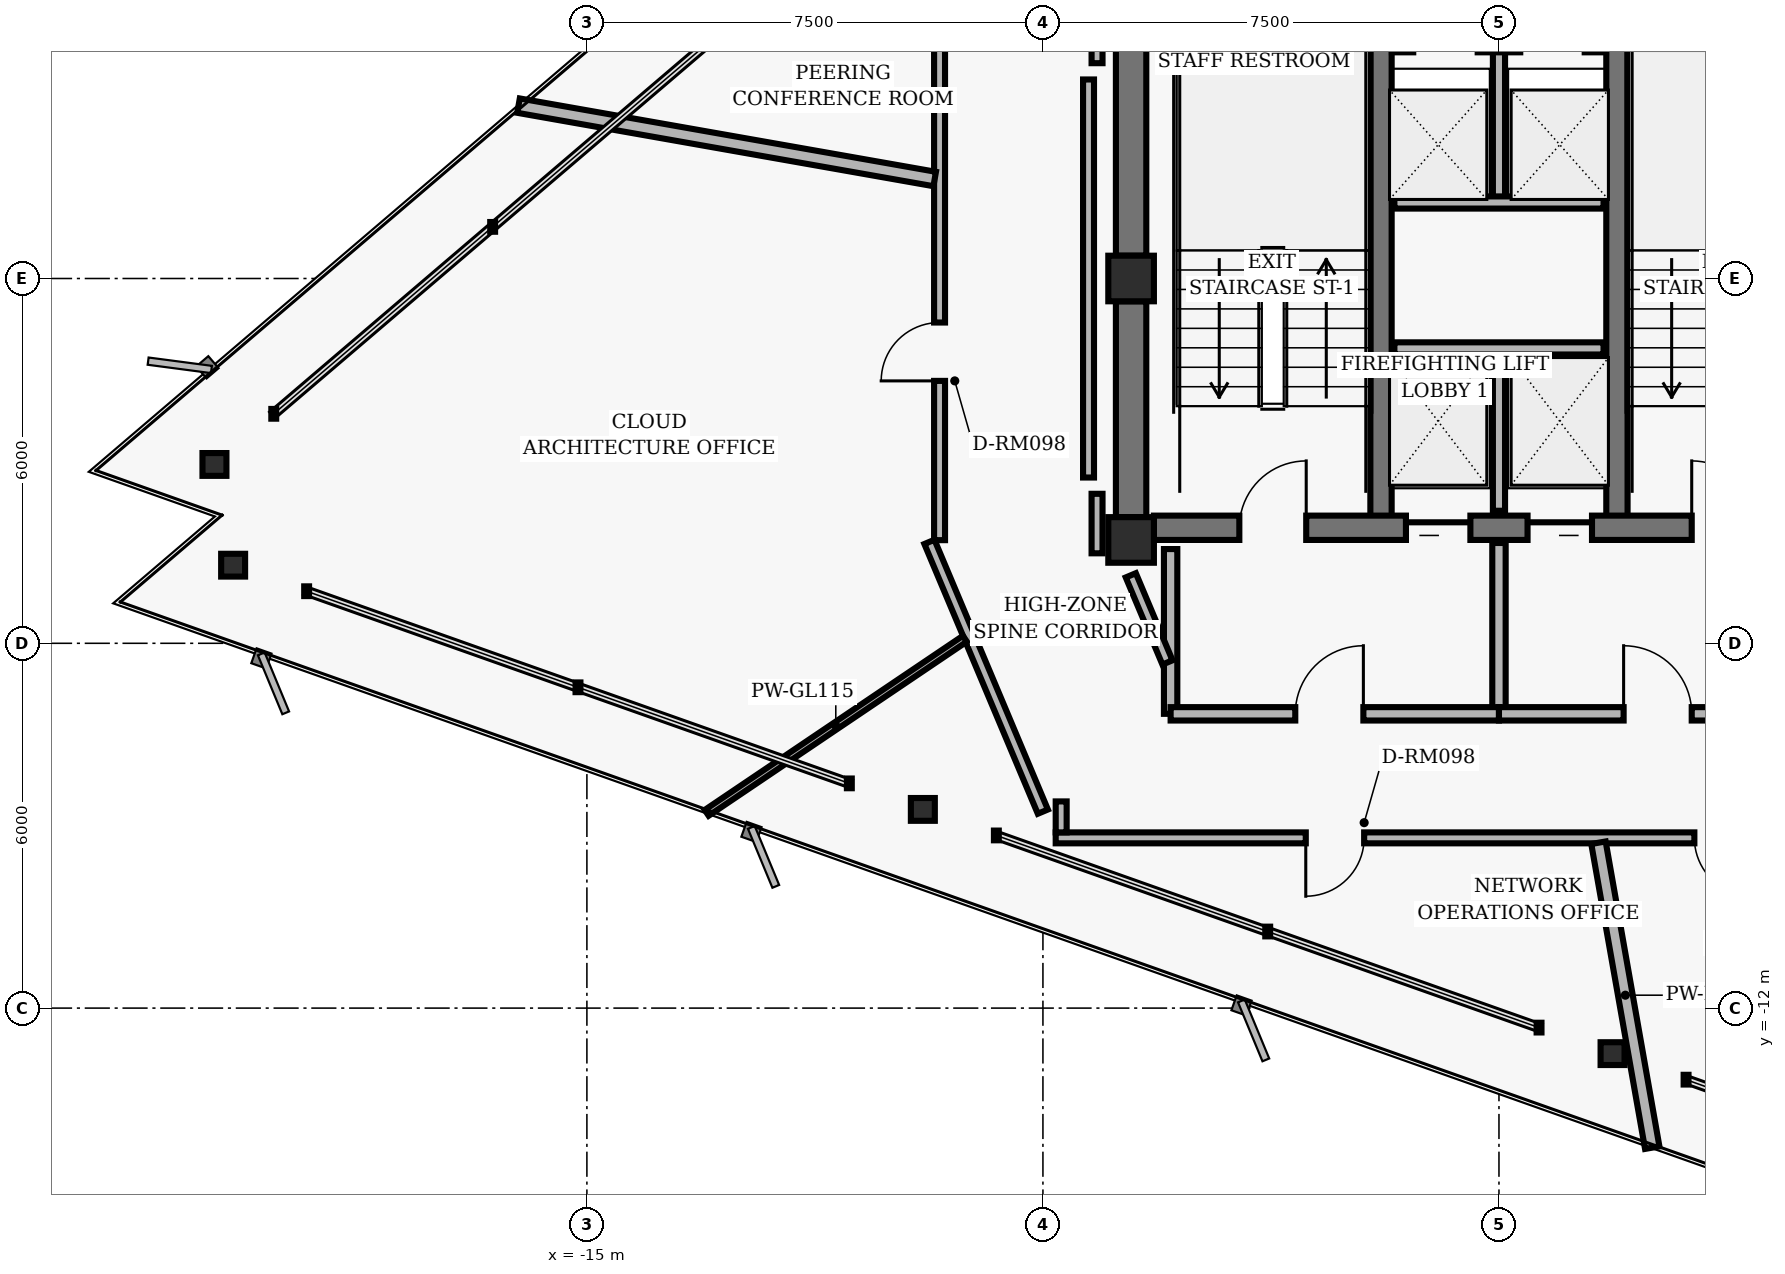
"""IFC4 building model, lengths in metres.
Left out: names, types, materials, properties, quantities, classifications, styles, units other than length and angle.
Written with IfcOpenShell. Run it as: python <this file> out.ifc"""

import sys

from ifc_helpers import new_model, si_unit, direction, frame, frame_2d, origin, origin_2d, place, context, subcontext, project, spatial, rectangle, hollow_rectangle, i_section, extrude, element, fill, save


model = new_model("IFC4")
c1 = context("Model", 3, precision=1e-05, world=origin(), true_north=direction((0.0, 1.0)))
c2 = subcontext(c1, "Body", "Model", "MODEL_VIEW")
j1 = project(units=[si_unit("LENGTHUNIT", "METRE"), si_unit("PLANEANGLEUNIT", "RADIAN")], contexts=[c1])
p1 = place(None, origin())
s1 = spatial("IfcSite", under=j1, at=p1, CompositionType="ELEMENT")
p2 = place(p1, origin())
s2 = spatial("IfcBuilding", under=s1, at=p2, CompositionType="ELEMENT")
p3 = place(p2, frame((0.0, 0.0, 190.56)))
s3 = spatial("IfcBuildingStorey", under=s2, at=p3, CompositionType="ELEMENT", Elevation=190.56)
for number, where, z_axis, x_axis in (
    (1, (-6.05, 0.0, 0.0), (0.0, 0.0, 1.0), (1.0, 0.0, 0.0)),
    (2, (-6.05, -4.3, 0.0), (0.0, 0.0, 1.0), (1.0, 0.0, 0.0)),
):
    element("IfcColumn", number, at=place(p3, frame(where, z_axis=z_axis, x_axis=x_axis)), inside=s3, PredefinedType="COLUMN", context=c2, shape_type="SweptSolid", body=[
        extrude(hollow_rectangle(XDim=0.75, YDim=0.75, WallThickness=0.05, InnerFilletRadius=0.02, OuterFilletRadius=0.04, at=origin_2d()), origin(), (0.0, 0.0, 1.0), 3.04),
    ])
p4 = place(p3, frame((-6.05, 0.375, 0.0), z_axis=(0.0, 0.0, 1.0), x_axis=(0.0, 1.0, 0.0)))
e3 = element("IfcWall", 3, at=p4, inside=s3, PredefinedType="SHEAR", context=c2, shape_type="SweptSolid", body=[
    extrude(rectangle(XDim=3.75, YDim=0.5, at=frame_2d((1.875, 0.0))), origin(), (0.0, 0.0, 1.0), 2.618),
])
p5 = place(p3, frame((-6.05, -3.925, 0.0), z_axis=(0.0, 0.0, 1.0), x_axis=(0.0, 1.0, 0.0)))
e4 = element("IfcWall", 4, at=p5, inside=s3, PredefinedType="SHEAR", context=c2, shape_type="SweptSolid", body=[
    extrude(rectangle(XDim=3.55, YDim=0.5, at=frame_2d((1.775, 0.0))), origin(), (0.0, 0.0, 1.0), 2.618),
])
for number, where, z_axis, x_axis in (
    (5, (-1.94, -4.1, 0.0), (0.0, 0.0, 1.0), (0.0, 1.0, 0.0)),
    (6, (1.94, -4.1, 0.0), (0.0, 0.0, 1.0), (0.0, 1.0, 0.0)),
):
    element("IfcWall", number, at=place(p3, frame(where, z_axis=z_axis, x_axis=x_axis)), inside=s3, PredefinedType="SHEAR", context=c2, shape_type="SweptSolid", body=[
        extrude(rectangle(XDim=8.2, YDim=0.35, at=frame_2d((4.1, 0.0))), origin(), (0.0, 0.0, 1.0), 2.618),
    ])
p6 = place(p3, frame((-5.675, -4.1, 0.0), z_axis=(0.0, 0.0, 1.0), x_axis=(1.0, 0.0, 0.0)))
e7 = element("IfcWall", 7, at=p6, inside=s3, PredefinedType="SHEAR", context=c2, shape_type="SweptSolid", body=[
    extrude(rectangle(XDim=11.35, YDim=0.4, at=frame_2d((5.675, 0.0))), origin(), (0.0, 0.0, 1.0), 2.618),
])
p7 = place(p6, frame((1.405, 0.0, 0.0)))
e8 = element("IfcOpeningElement", 8, at=p7, cuts=e7, PredefinedType="OPENING", context=c2, shape_type="SweptSolid", body=[
    extrude(rectangle(XDim=1.1, YDim=2.04, at=frame_2d((0.55, 1.02))), frame((0.0, 0.21, 0.0), z_axis=(0.0, -1.0, 0.0), x_axis=(1.0, 0.0, 0.0)), (0.0, 0.0, 1.0), 0.42),
])
p8 = place(p6, frame((8.845, 0.0, 0.0)))
e9 = element("IfcOpeningElement", 9, at=p8, cuts=e7, PredefinedType="OPENING", context=c2, shape_type="SweptSolid", body=[
    extrude(rectangle(XDim=1.1, YDim=2.04, at=frame_2d((0.55, 1.02))), frame((0.0, 0.21, 0.0), z_axis=(0.0, -1.0, 0.0), x_axis=(1.0, 0.0, 0.0)), (0.0, 0.0, 1.0), 0.42),
])
p9 = place(p6, frame((4.145, 0.0, 0.0)))
e10 = element("IfcOpeningElement", 10, at=p9, cuts=e7, PredefinedType="OPENING", context=c2, shape_type="SweptSolid", body=[
    extrude(rectangle(XDim=1.06, YDim=2.04, at=frame_2d((0.53, 1.02))), frame((0.0, 0.21, 0.0), z_axis=(0.0, -1.0, 0.0), x_axis=(1.0, 0.0, 0.0)), (0.0, 0.0, 1.0), 0.42),
])
p10 = place(p6, frame((6.145, 0.0, 0.0)))
e11 = element("IfcOpeningElement", 11, at=p10, cuts=e7, PredefinedType="OPENING", context=c2, shape_type="SweptSolid", body=[
    extrude(rectangle(XDim=1.06, YDim=2.04, at=frame_2d((0.53, 1.02))), frame((0.0, 0.21, 0.0), z_axis=(0.0, -1.0, 0.0), x_axis=(1.0, 0.0, 0.0)), (0.0, 0.0, 1.0), 0.42),
])
for number, where, z_axis, x_axis in (
    (12, (-21.125, -3.059, 0.0), (0.0, 0.0, 1.0), (1.0, 0.0, 0.0)),
    (13, (-20.818, -4.715, 0.0), (0.0, 0.0, 1.0), (1.0, 0.0, 0.0)),
    (14, (-9.475, -8.732, 0.0), (0.0, 0.0, 1.0), (1.0, 0.0, 0.0)),
    (15, (1.868, -12.749, 0.0), (0.0, 0.0, 1.0), (1.0, 0.0, 0.0)),
):
    element("IfcColumn", number, at=place(p3, frame(where, z_axis=z_axis, x_axis=x_axis)), inside=s3, PredefinedType="COLUMN", context=c2, shape_type="SweptSolid", body=[
        extrude(i_section(OverallWidth=0.394, OverallDepth=0.375, WebThickness=0.017, FlangeThickness=0.028, FilletRadius=0.016, at=origin_2d()), origin(), (0.0, 0.0, 1.0), 3.04),
    ])
p11 = place(p3, frame((0.0, -3.82, 0.0), z_axis=(0.0, 0.0, 1.0), x_axis=(0.0, 1.0, 0.0)))
e16 = element("IfcWall", 16, at=p11, inside=s3, PredefinedType="PARTITIONING", context=c2, shape_type="SweptSolid", body=[
    extrude(rectangle(XDim=2.67, YDim=0.2, at=frame_2d((1.335, 0.0))), origin(), (0.0, 0.0, 1.0), 2.593),
])
p12 = place(p3, frame((-1.72, -1.15, 0.0), z_axis=(0.0, 0.0, 1.0), x_axis=(1.0, 0.0, 0.0)))
e17 = element("IfcWall", 17, at=p12, inside=s3, PredefinedType="PARTITIONING", context=c2, shape_type="SweptSolid", body=[
    extrude(rectangle(XDim=3.44, YDim=0.2, at=frame_2d((1.72, 0.0))), origin(), (0.0, 0.0, 1.0), 2.593),
])
p13 = place(p3, frame((-5.4, -7.16, 0.0), z_axis=(0.0, 0.0, 1.0), x_axis=(0.0, 1.0, 0.0)))
e18 = element("IfcWall", 18, at=p13, inside=s3, PredefinedType="PARTITIONING", context=c2, shape_type="SweptSolid", body=[
    extrude(rectangle(XDim=2.71, YDim=0.22, at=frame_2d((1.355, 0.0))), origin(), (0.0, 0.0, 1.0), 2.593),
])
p14 = place(p3, frame((0.0, -7.16, 0.0), z_axis=(0.0, 0.0, 1.0), x_axis=(0.0, 1.0, 0.0)))
e19 = element("IfcWall", 19, at=p14, inside=s3, PredefinedType="PARTITIONING", context=c2, shape_type="SweptSolid", body=[
    extrude(rectangle(XDim=2.81, YDim=0.22, at=frame_2d((1.405, 0.0))), origin(), (0.0, 0.0, 1.0), 2.593),
])
p15 = place(p3, frame((-5.4, -7.16, 0.0), z_axis=(0.0, 0.0, 1.0), x_axis=(1.0, 0.0, 0.0)))
e20 = element("IfcWall", 20, at=p15, inside=s3, PredefinedType="PARTITIONING", context=c2, shape_type="SweptSolid", body=[
    extrude(rectangle(XDim=5.4, YDim=0.22, at=frame_2d((2.7, 0.0))), origin(), (0.0, 0.0, 1.0), 2.215),
])
p16 = place(p15, frame((2.05, 0.0, 0.0)))
e21 = element("IfcOpeningElement", 21, at=p16, cuts=e20, PredefinedType="OPENING", context=c2, shape_type="SweptSolid", body=[
    extrude(rectangle(XDim=1.12, YDim=2.02, at=frame_2d((0.56, 1.01))), frame((0.0, 0.12, 0.0), z_axis=(0.0, -1.0, 0.0), x_axis=(1.0, 0.0, 0.0)), (0.0, 0.0, 1.0), 0.24),
])
p17 = place(p3, frame((0.0, -7.16, 0.0), z_axis=(0.0, 0.0, 1.0), x_axis=(1.0, 0.0, 0.0)))
e22 = element("IfcWall", 22, at=p17, inside=s3, PredefinedType="PARTITIONING", context=c2, shape_type="SweptSolid", body=[
    extrude(rectangle(XDim=5.4, YDim=0.22, at=frame_2d((2.7, 0.0))), origin(), (0.0, 0.0, 1.0), 2.215),
])
p18 = place(p17, frame((2.05, 0.0, 0.0)))
e23 = element("IfcOpeningElement", 23, at=p18, cuts=e22, PredefinedType="OPENING", context=c2, shape_type="SweptSolid", body=[
    extrude(rectangle(XDim=1.12, YDim=2.02, at=frame_2d((0.56, 1.01))), frame((0.0, 0.12, 0.0), z_axis=(0.0, -1.0, 0.0), x_axis=(1.0, 0.0, 0.0)), (0.0, 0.0, 1.0), 0.24),
])
p19 = place(p3, frame((0.0, 1.25, 0.0), z_axis=(0.0, 0.0, 1.0), x_axis=(0.0, 1.0, 0.0)))
e24 = element("IfcWall", 24, at=p19, inside=s3, PredefinedType="PARTITIONING", context=c2, shape_type="SweptSolid", body=[
    extrude(rectangle(XDim=2.77, YDim=0.2, at=frame_2d((1.385, 0.0))), origin(), (0.0, 0.0, 1.0), 2.593),
])
p20 = place(p3, frame((-1.72, 1.25, 0.0), z_axis=(0.0, 0.0, 1.0), x_axis=(1.0, 0.0, 0.0)))
e25 = element("IfcWall", 25, at=p20, inside=s3, PredefinedType="PARTITIONING", context=c2, shape_type="SweptSolid", body=[
    extrude(rectangle(XDim=3.44, YDim=0.2, at=frame_2d((1.72, 0.0))), origin(), (0.0, 0.0, 1.0), 2.593),
])
p21 = place(p3, frame((-1.76, 3.82, 0.0), z_axis=(0.0, 0.0, 1.0), x_axis=(1.0, 0.0, 0.0)))
e26 = element("IfcWall", 26, at=p21, inside=s3, PredefinedType="PARTITIONING", context=c2, shape_type="SweptSolid", body=[
    extrude(rectangle(XDim=3.52, YDim=0.2, at=frame_2d((1.76, 0.0))), origin(), (0.0, 0.0, 1.0), 2.593),
])
p22 = place(p21, frame((0.35, 0.0, 0.0)))
e27 = element("IfcOpeningElement", 27, at=p22, cuts=e26, PredefinedType="OPENING", context=c2, shape_type="SweptSolid", body=[
    extrude(rectangle(XDim=1.06, YDim=2.04, at=frame_2d((0.53, 1.02))), frame((0.0, 0.11, 0.0), z_axis=(0.0, -1.0, 0.0), x_axis=(1.0, 0.0, 0.0)), (0.0, 0.0, 1.0), 0.22),
])
p23 = place(p21, frame((2.11, 0.0, 0.0)))
e28 = element("IfcOpeningElement", 28, at=p23, cuts=e26, PredefinedType="OPENING", context=c2, shape_type="SweptSolid", body=[
    extrude(rectangle(XDim=1.06, YDim=2.04, at=frame_2d((0.53, 1.02))), frame((0.0, 0.11, 0.0), z_axis=(0.0, -1.0, 0.0), x_axis=(1.0, 0.0, 0.0)), (0.0, 0.0, 1.0), 0.22),
])
p24 = place(p3, frame((-7.501, -8.769, 0.0), z_axis=(0.0, 0.0, 1.0), x_axis=(-0.387573945081, 0.921838617706, 0.0)))
e29 = element("IfcWall", 29, at=p24, inside=s3, PredefinedType="PARTITIONING", context=c2, shape_type="SweptSolid", body=[
    extrude(rectangle(XDim=4.813, YDim=0.18, at=frame_2d((2.407, 0.0))), origin(), (0.0, 0.0, 1.0), 2.593),
])
p25 = place(p3, frame((-9.2, -4.303, 0.0), z_axis=(0.0, 0.0, 1.0), x_axis=(0.0, 1.0, 0.0)))
e30 = element("IfcWall", 30, at=p25, inside=s3, PredefinedType="PARTITIONING", context=c2, shape_type="SweptSolid", body=[
    extrude(rectangle(XDim=8.607, YDim=0.18, at=frame_2d((4.303, 0.0))), origin(), (0.0, 0.0, 1.0), 2.593),
])
p26 = place(p25, frame((2.619, 0.0, 0.0)))
e31 = element("IfcOpeningElement", 31, at=p26, cuts=e30, PredefinedType="OPENING", context=c2, shape_type="SweptSolid", body=[
    extrude(rectangle(XDim=0.96, YDim=2.02, at=frame_2d((0.48, 1.01))), frame((0.0, 0.1, 0.0), z_axis=(0.0, -1.0, 0.0), x_axis=(1.0, 0.0, 0.0)), (0.0, 0.0, 1.0), 0.2),
])
p27 = place(p3, frame((-6.61, 4.94, 0.0), z_axis=(0.0, 0.0, 1.0), x_axis=(0.0, -1.0, 0.0)))
e32 = element("IfcWall", 32, at=p27, inside=s3, PredefinedType="PARTITIONING", context=c2, shape_type="SweptSolid", body=[
    extrude(rectangle(XDim=1.399, YDim=0.18, at=frame_2d((0.699, 0.0))), origin(), (0.0, 0.0, 1.0), 2.593),
])
p28 = place(p3, frame((-6.75, 3.273, 0.0), z_axis=(0.0, 0.0, 1.0), x_axis=(0.0, -1.0, 0.0)))
e33 = element("IfcWall", 33, at=p28, inside=s3, PredefinedType="PARTITIONING", context=c2, shape_type="SweptSolid", body=[
    extrude(rectangle(XDim=6.547, YDim=0.18, at=frame_2d((3.273, 0.0))), origin(), (0.0, 0.0, 1.0), 2.593),
])
p29 = place(p3, frame((-6.61, -3.541, 0.0), z_axis=(0.0, 0.0, 1.0), x_axis=(0.0, -1.0, 0.0)))
e34 = element("IfcWall", 34, at=p29, inside=s3, PredefinedType="PARTITIONING", context=c2, shape_type="SweptSolid", body=[
    extrude(rectangle(XDim=0.979, YDim=0.18, at=frame_2d((0.489, 0.0))), origin(), (0.0, 0.0, 1.0), 2.593),
])
p30 = place(p3, frame((-6.055, -4.882, 0.0), z_axis=(0.0, 0.0, 1.0), x_axis=(0.387579540458, -0.921836265189, 0.0)))
e35 = element("IfcWall", 35, at=p30, inside=s3, PredefinedType="PARTITIONING", context=c2, shape_type="SweptSolid", body=[
    extrude(rectangle(XDim=1.555, YDim=0.18, at=frame_2d((0.777, 0.0))), origin(), (0.0, 0.0, 1.0), 2.593),
])
p31 = place(p3, frame((6.01, -9.2, 0.0), z_axis=(0.0, 0.0, 1.0), x_axis=(-1.0, 0.0, 0.0)))
e36 = element("IfcWall", 36, at=p31, inside=s3, PredefinedType="PARTITIONING", context=c2, shape_type="SweptSolid", body=[
    extrude(rectangle(XDim=13.3, YDim=0.18, at=frame_2d((6.65, 0.0))), origin(), (0.0, 0.0, 1.0), 2.215),
])
p32 = place(p31, frame((8.227, 0.0, 0.0)))
e37 = element("IfcOpeningElement", 37, at=p32, cuts=e36, PredefinedType="OPENING", context=c2, shape_type="SweptSolid", body=[
    extrude(rectangle(XDim=0.96, YDim=2.02, at=frame_2d((0.48, 1.01))), frame((0.0, 0.1, 0.0), z_axis=(0.0, -1.0, 0.0), x_axis=(1.0, 0.0, 0.0)), (0.0, 0.0, 1.0), 0.2),
])
p33 = place(p31, frame((1.836, 0.0, 0.0)))
e38 = element("IfcOpeningElement", 38, at=p33, cuts=e36, PredefinedType="OPENING", context=c2, shape_type="SweptSolid", body=[
    extrude(rectangle(XDim=0.96, YDim=2.02, at=frame_2d((0.48, 1.01))), frame((0.0, 0.1, 0.0), z_axis=(0.0, -1.0, 0.0), x_axis=(1.0, 0.0, 0.0)), (0.0, 0.0, 1.0), 0.2),
])
p34 = place(p3, frame((-7.2, -9.11, 0.0), z_axis=(0.0, 0.0, 1.0), x_axis=(0.0, 1.0, 0.0)))
e39 = element("IfcWall", 39, at=p34, inside=s3, PredefinedType="PARTITIONING", context=c2, shape_type="SweptSolid", body=[
    extrude(rectangle(XDim=0.51, YDim=0.18, at=frame_2d((0.255, 0.0))), origin(), (0.0, 0.0, 1.0), 2.593),
])
p35 = place(p3, frame((-8.784, -5.925, 0.0), z_axis=(0.0, 0.0, 1.0), x_axis=(-0.829060822753, -0.559158432089, 0.0)))
e40 = element("IfcWall", 40, at=p35, inside=s3, PredefinedType="MOVABLE", context=c2, shape_type="SweptSolid", body=[
    extrude(rectangle(XDim=5.122, YDim=0.115, at=frame_2d((2.561, 0.0))), origin(), (0.0, 0.0, 1.0), 2.593),
])
p36 = place(p3, frame((1.636, -9.28, 0.0), z_axis=(0.0, 0.0, 1.0), x_axis=(0.173634919368, -0.984810090716, 0.0)))
e41 = element("IfcWall", 41, at=p36, inside=s3, PredefinedType="PARTITIONING", context=c2, shape_type="SweptSolid", body=[
    extrude(rectangle(XDim=5.093, YDim=0.24, at=frame_2d((2.546, 0.0))), origin(), (0.0, 0.0, 1.0), 2.593),
])
p37 = place(p3, frame((-9.28, 1.636, 0.0), z_axis=(0.0, 0.0, 1.0), x_axis=(-0.984803709336, 0.173671108934, 0.0)))
e42 = element("IfcWall", 42, at=p37, inside=s3, PredefinedType="PARTITIONING", context=c2, shape_type="SweptSolid", body=[
    extrude(rectangle(XDim=6.95, YDim=0.24, at=frame_2d((3.475, 0.0))), origin(), (0.0, 0.0, 1.0), 2.593),
])
p38 = place(p7, origin())
e43 = element("IfcDoor", 43, at=p38, inside=s3, OperationType="SINGLE_SWING_RIGHT", PredefinedType="DOOR", context=c2, shape_type="SweptSolid", body=[
    extrude(rectangle(XDim=1.1, YDim=2.04, at=frame_2d((0.55, 1.02))), frame((0.0, 0.025, 0.0), z_axis=(0.0, -1.0, 0.0), x_axis=(1.0, 0.0, 0.0)), (0.0, 0.0, 1.0), 0.05),
])
fill(e8, e43)
p39 = place(p8, origin())
e44 = element("IfcDoor", 44, at=p39, inside=s3, OperationType="SINGLE_SWING_LEFT", PredefinedType="DOOR", context=c2, shape_type="SweptSolid", body=[
    extrude(rectangle(XDim=1.1, YDim=2.04, at=frame_2d((0.55, 1.02))), frame((0.0, 0.025, 0.0), z_axis=(0.0, -1.0, 0.0), x_axis=(1.0, 0.0, 0.0)), (0.0, 0.0, 1.0), 0.05),
])
fill(e9, e44)
p40 = place(p9, origin())
e45 = element("IfcDoor", 45, at=p40, inside=s3, OperationType="SLIDING_TO_LEFT", PredefinedType="DOOR", context=c2, shape_type="SweptSolid", body=[
    extrude(rectangle(XDim=1.06, YDim=2.04, at=frame_2d((0.53, 1.02))), frame((0.0, 0.025, 0.0), z_axis=(0.0, -1.0, 0.0), x_axis=(1.0, 0.0, 0.0)), (0.0, 0.0, 1.0), 0.05),
])
fill(e10, e45)
p41 = place(p10, origin())
e46 = element("IfcDoor", 46, at=p41, inside=s3, OperationType="SLIDING_TO_RIGHT", PredefinedType="DOOR", context=c2, shape_type="SweptSolid", body=[
    extrude(rectangle(XDim=1.06, YDim=2.04, at=frame_2d((0.53, 1.02))), frame((0.0, 0.025, 0.0), z_axis=(0.0, -1.0, 0.0), x_axis=(1.0, 0.0, 0.0)), (0.0, 0.0, 1.0), 0.05),
])
fill(e11, e46)
p42 = place(p16, origin())
e47 = element("IfcDoor", 47, at=p42, inside=s3, OperationType="SINGLE_SWING_RIGHT", PredefinedType="DOOR", context=c2, shape_type="SweptSolid", body=[
    extrude(rectangle(XDim=1.12, YDim=2.02, at=frame_2d((0.56, 1.01))), frame((0.0, 0.025, 0.0), z_axis=(0.0, -1.0, 0.0), x_axis=(1.0, 0.0, 0.0)), (0.0, 0.0, 1.0), 0.05),
])
fill(e21, e47)
p43 = place(p18, origin())
e48 = element("IfcDoor", 48, at=p43, inside=s3, OperationType="SINGLE_SWING_LEFT", PredefinedType="DOOR", context=c2, shape_type="SweptSolid", body=[
    extrude(rectangle(XDim=1.12, YDim=2.02, at=frame_2d((0.56, 1.01))), frame((0.0, 0.025, 0.0), z_axis=(0.0, -1.0, 0.0), x_axis=(1.0, 0.0, 0.0)), (0.0, 0.0, 1.0), 0.05),
])
fill(e23, e48)
p44 = place(p26, origin())
e49 = element("IfcDoor", 49, at=p44, inside=s3, OperationType="SINGLE_SWING_LEFT", PredefinedType="DOOR", context=c2, shape_type="SweptSolid", body=[
    extrude(rectangle(XDim=0.96, YDim=2.02, at=frame_2d((0.48, 1.01))), frame((0.0, 0.025, 0.0), z_axis=(0.0, -1.0, 0.0), x_axis=(1.0, 0.0, 0.0)), (0.0, 0.0, 1.0), 0.05),
])
fill(e31, e49)
p45 = place(p32, origin())
e50 = element("IfcDoor", 50, at=p45, inside=s3, OperationType="SINGLE_SWING_RIGHT", PredefinedType="DOOR", context=c2, shape_type="SweptSolid", body=[
    extrude(rectangle(XDim=0.96, YDim=2.02, at=frame_2d((0.48, 1.01))), frame((0.0, 0.025, 0.0), z_axis=(0.0, -1.0, 0.0), x_axis=(1.0, 0.0, 0.0)), (0.0, 0.0, 1.0), 0.05),
])
fill(e37, e50)
p46 = place(p33, origin())
e51 = element("IfcDoor", 51, at=p46, inside=s3, OperationType="SINGLE_SWING_LEFT", PredefinedType="DOOR", context=c2, shape_type="SweptSolid", body=[
    extrude(rectangle(XDim=0.96, YDim=2.02, at=frame_2d((0.48, 1.01))), frame((0.0, 0.025, 0.0), z_axis=(0.0, -1.0, 0.0), x_axis=(1.0, 0.0, 0.0)), (0.0, 0.0, 1.0), 0.05),
])
fill(e38, e51)
save(model, sys.argv[1])
